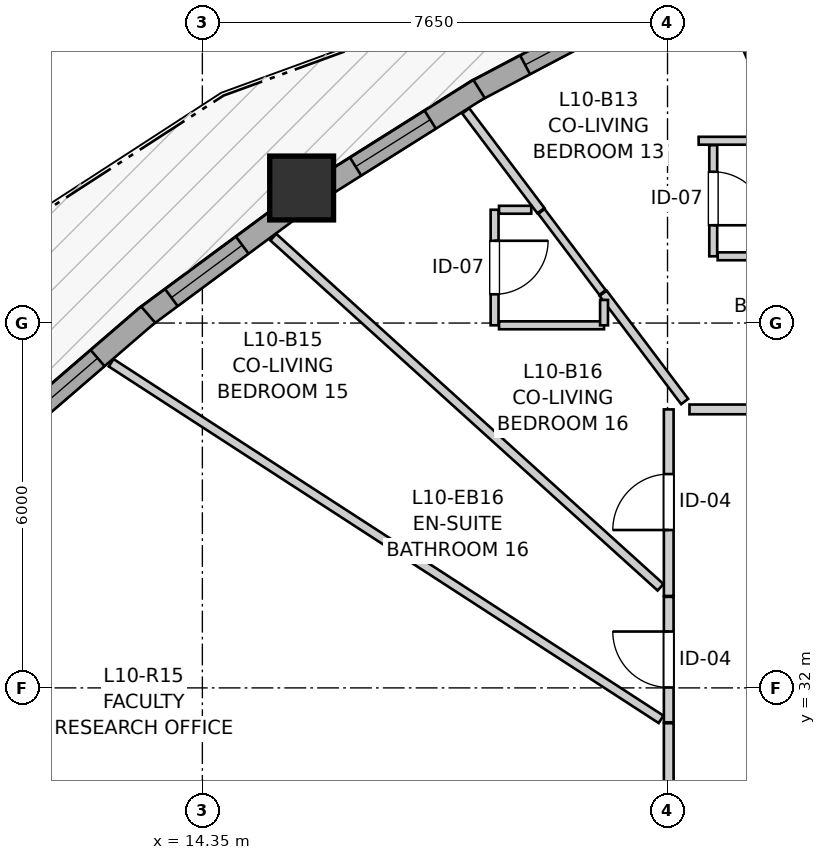
"""IFC4 building model, lengths in metres.
Left out: names, types, materials, properties, quantities, classifications, styles, units other than length and angle.
Written with IfcOpenShell. Run it as: python <this file> out.ifc"""

import sys

from ifc_helpers import new_model, si_unit, direction, frame, frame_2d, origin, origin_2d, place, context, subcontext, project, spatial, rectangle, extrude, source, transform, mapped, element, fill, save


model = new_model("IFC4")
c1 = context("Model", 3, precision=1e-05, world=origin(), true_north=direction((0.0, 1.0)))
c2 = subcontext(c1, "Body", "Model", "MODEL_VIEW")
j1 = project(units=[si_unit("LENGTHUNIT", "METRE"), si_unit("PLANEANGLEUNIT", "RADIAN")], contexts=[c1])
p1 = place(None, origin())
s1 = spatial("IfcSite", under=j1, at=p1, CompositionType="ELEMENT")
p2 = place(p1, origin())
s2 = spatial("IfcBuilding", under=s1, at=p2, CompositionType="ELEMENT")
p3 = place(p2, frame((0.0, 0.0, 36.6)))
s3 = spatial("IfcBuildingStorey", under=s2, at=p3, CompositionType="ELEMENT", Elevation=36.6)
m1 = source(origin(), c2, "Body", "SweptSolid", [
    extrude(rectangle(XDim=1.05, YDim=1.05, at=origin_2d()), origin(), (0.0, 0.0, 1.0), 2.94),
])
p4 = place(p3, frame((15.983, 40.221, 0.0), z_axis=(0.0, 0.0, 1.0), x_axis=(1.0, 0.0, 0.0)))
e1 = element("IfcColumn", 1, at=p4, inside=s3, PredefinedType="COLUMN", context=c2, shape_type="MappedRepresentation", body=[
    mapped(m1, transform((0.0, 0.0, 0.0), x_axis=(1.0, 0.0, 0.0), y_axis=(0.0, 1.0, 0.0), z_axis=(0.0, 0.0, 1.0), scale=1.0)),
])
p5 = place(p3, frame((21.757, 43.354, 0.0), z_axis=(0.0, 0.0, 1.0), x_axis=(-0.884394035355, -0.466741031224, 0.0)))
e2 = element("IfcWall", 2, at=p5, inside=s3, PredefinedType="SOLIDWALL", context=c2, shape_type="SweptSolid", body=[
    extrude(rectangle(XDim=3.317, YDim=0.35, at=frame_2d((1.659, 0.0))), origin(), (0.0, 0.0, 1.0), 2.42),
])
p6 = place(p5, frame((0.924, 0.0, 0.82)))
e3 = element("IfcOpeningElement", 3, at=p6, cuts=e2, PredefinedType="OPENING", context=c2, shape_type="SweptSolid", body=[
    extrude(rectangle(XDim=1.45, YDim=1.25, at=frame_2d((0.725, 0.625))), frame((0.0, 0.185, 0.0), z_axis=(0.0, -1.0, 0.0), x_axis=(1.0, 0.0, 0.0)), (0.0, 0.0, 1.0), 0.37),
])
p7 = place(p3, frame((18.901, 41.85, 0.0), z_axis=(0.0, 0.0, 1.0), x_axis=(-0.846436796602, -0.532489201167, 0.0)))
e4 = element("IfcWall", 4, at=p7, inside=s3, PredefinedType="SOLIDWALL", context=c2, shape_type="SweptSolid", body=[
    extrude(rectangle(XDim=3.038, YDim=0.35, at=frame_2d((1.519, 0.0))), origin(), (0.0, 0.0, 1.0), 2.42),
])
p8 = place(p7, frame((0.948, 0.0, 0.82)))
e5 = element("IfcOpeningElement", 5, at=p8, cuts=e4, PredefinedType="OPENING", context=c2, shape_type="SweptSolid", body=[
    extrude(rectangle(XDim=1.45, YDim=1.25, at=frame_2d((0.725, 0.625))), frame((0.0, 0.185, 0.0), z_axis=(0.0, -1.0, 0.0), x_axis=(1.0, 0.0, 0.0)), (0.0, 0.0, 1.0), 0.37),
])
p9 = place(p3, frame((15.846, 39.902, 0.0), z_axis=(0.0, 0.0, 1.0), x_axis=(-0.803789189233, -0.594914228501, 0.0)))
e6 = element("IfcWall", 6, at=p9, inside=s3, PredefinedType="SOLIDWALL", context=c2, shape_type="SweptSolid", body=[
    extrude(rectangle(XDim=3.056, YDim=0.35, at=frame_2d((1.528, 0.0))), origin(), (0.0, 0.0, 1.0), 2.42),
])
p10 = place(p9, frame((1.044, 0.0, 0.82)))
e7 = element("IfcOpeningElement", 7, at=p10, cuts=e6, PredefinedType="OPENING", context=c2, shape_type="SweptSolid", body=[
    extrude(rectangle(XDim=1.45, YDim=1.25, at=frame_2d((0.725, 0.625))), frame((0.0, 0.185, 0.0), z_axis=(0.0, -1.0, 0.0), x_axis=(1.0, 0.0, 0.0)), (0.0, 0.0, 1.0), 0.37),
])
p11 = place(p3, frame((13.458, 38.139, 0.0), z_axis=(0.0, 0.0, 1.0), x_axis=(-0.757450680395, -0.652892385289, 0.0)))
e8 = element("IfcWall", 8, at=p11, inside=s3, PredefinedType="SOLIDWALL", context=c2, shape_type="SweptSolid", body=[
    extrude(rectangle(XDim=3.374, YDim=0.35, at=frame_2d((1.687, 0.0))), origin(), (0.0, 0.0, 1.0), 2.42),
])
p12 = place(p11, frame((1.097, 0.0, 0.82)))
e9 = element("IfcOpeningElement", 9, at=p12, cuts=e8, PredefinedType="OPENING", context=c2, shape_type="SweptSolid", body=[
    extrude(rectangle(XDim=1.95, YDim=1.4, at=frame_2d((0.975, 0.7))), frame((0.0, 0.185, 0.0), z_axis=(0.0, -1.0, 0.0), x_axis=(1.0, 0.0, 0.0)), (0.0, 0.0, 1.0), 0.37),
])
p13 = place(p3, frame((22.02, 27.85, 0.0), z_axis=(0.0, 0.0, 1.0), x_axis=(0.0, 1.0, 0.0)))
e10 = element("IfcWall", 10, at=p13, inside=s3, PredefinedType="PARTITIONING", context=c2, shape_type="SweptSolid", body=[
    extrude(rectangle(XDim=3.569, YDim=0.16, at=frame_2d((1.784, 0.0))), origin(), (0.0, 0.0, 1.0), 2.94),
])
p14 = place(p13, frame((1.325, 0.0, 0.0)))
e11 = element("IfcOpeningElement", 11, at=p14, cuts=e10, PredefinedType="OPENING", context=c2, shape_type="SweptSolid", body=[
    extrude(rectangle(XDim=0.96, YDim=2.1, at=frame_2d((0.48, 1.05))), frame((0.0, 0.09, 0.0), z_axis=(0.0, -1.0, 0.0), x_axis=(1.0, 0.0, 0.0)), (0.0, 0.0, 1.0), 0.18),
])
p15 = place(p3, frame((22.361, 36.58, 0.0), z_axis=(0.0, 0.0, 1.0), x_axis=(1.0, 0.0, 0.0)))
e12 = element("IfcWall", 12, at=p15, inside=s3, PredefinedType="PARTITIONING", context=c2, shape_type="SweptSolid", body=[
    extrude(rectangle(XDim=3.498, YDim=0.16, at=frame_2d((1.749, 0.0))), origin(), (0.0, 0.0, 1.0), 2.548),
])
p16 = place(p15, frame((1.291, 0.0, 0.0)))
e13 = element("IfcOpeningElement", 13, at=p16, cuts=e12, PredefinedType="OPENING", context=c2, shape_type="SweptSolid", body=[
    extrude(rectangle(XDim=0.92, YDim=2.1, at=frame_2d((0.46, 1.05))), frame((0.0, 0.09, 0.0), z_axis=(0.0, -1.0, 0.0), x_axis=(1.0, 0.0, 0.0)), (0.0, 0.0, 1.0), 0.18),
])
p17 = place(p3, frame((22.02, 33.512, 0.0), z_axis=(0.0, 0.0, 1.0), x_axis=(0.0, 1.0, 0.0)))
e14 = element("IfcWall", 14, at=p17, inside=s3, PredefinedType="PARTITIONING", context=c2, shape_type="SweptSolid", body=[
    extrude(rectangle(XDim=3.068, YDim=0.16, at=frame_2d((1.534, 0.0))), origin(), (0.0, 0.0, 1.0), 2.94),
])
p18 = place(p17, frame((1.084, 0.0, 0.0)))
e15 = element("IfcOpeningElement", 15, at=p18, cuts=e14, PredefinedType="OPENING", context=c2, shape_type="SweptSolid", body=[
    extrude(rectangle(XDim=0.92, YDim=2.1, at=frame_2d((0.46, 1.05))), frame((0.0, 0.09, 0.0), z_axis=(0.0, -1.0, 0.0), x_axis=(1.0, 0.0, 0.0)), (0.0, 0.0, 1.0), 0.18),
])
p19 = place(p3, frame((22.02, 31.434, 0.0), z_axis=(0.0, 0.0, 1.0), x_axis=(0.0, 1.0, 0.0)))
e16 = element("IfcWall", 16, at=p19, inside=s3, PredefinedType="PARTITIONING", context=c2, shape_type="SweptSolid", body=[
    extrude(rectangle(XDim=2.063, YDim=0.16, at=frame_2d((1.031, 0.0))), origin(), (0.0, 0.0, 1.0), 2.94),
])
p20 = place(p19, frame((0.573, 0.0, 0.0)))
e17 = element("IfcOpeningElement", 17, at=p20, cuts=e16, PredefinedType="OPENING", context=c2, shape_type="SweptSolid", body=[
    extrude(rectangle(XDim=0.92, YDim=2.1, at=frame_2d((0.46, 1.05))), frame((0.0, 0.09, 0.0), z_axis=(0.0, -1.0, 0.0), x_axis=(1.0, 0.0, 0.0)), (0.0, 0.0, 1.0), 0.18),
])
p21 = place(p3, frame((22.752, 40.925, 0.0), z_axis=(0.0, 0.0, 1.0), x_axis=(0.0, -1.0, 0.0)))
e18 = element("IfcWall", 18, at=p21, inside=s3, PredefinedType="PARTITIONING", context=c2, shape_type="SweptSolid", body=[
    extrude(rectangle(XDim=1.827, YDim=0.13, at=frame_2d((0.914, 0.0))), origin(), (0.0, 0.0, 1.0), 2.94),
])
p22 = place(p21, frame((0.437, 0.0, 0.0)))
e19 = element("IfcOpeningElement", 19, at=p22, cuts=e18, PredefinedType="OPENING", context=c2, shape_type="SweptSolid", body=[
    extrude(rectangle(XDim=0.88, YDim=2.05, at=frame_2d((0.44, 1.025))), frame((0.0, 0.075, 0.0), z_axis=(0.0, -1.0, 0.0), x_axis=(1.0, 0.0, 0.0)), (0.0, 0.0, 1.0), 0.15),
])
p23 = place(p3, frame((19.156, 39.863, 0.0), z_axis=(0.0, 0.0, 1.0), x_axis=(0.0, -1.0, 0.0)))
e20 = element("IfcWall", 20, at=p23, inside=s3, PredefinedType="PARTITIONING", context=c2, shape_type="SweptSolid", body=[
    extrude(rectangle(XDim=1.9, YDim=0.13, at=frame_2d((0.95, 0.0))), origin(), (0.0, 0.0, 1.0), 2.94),
])
p24 = place(p23, frame((0.51, 0.0, 0.0)))
e21 = element("IfcOpeningElement", 21, at=p24, cuts=e20, PredefinedType="OPENING", context=c2, shape_type="SweptSolid", body=[
    extrude(rectangle(XDim=0.88, YDim=2.05, at=frame_2d((0.44, 1.025))), frame((0.0, 0.075, 0.0), z_axis=(0.0, -1.0, 0.0), x_axis=(1.0, 0.0, 0.0)), (0.0, 0.0, 1.0), 0.15),
])
p25 = place(p3, frame((12.85, 37.347, 0.0), z_axis=(0.0, 0.0, 1.0), x_axis=(0.839070272759, -0.544023048567, 0.0)))
e22 = element("IfcWall", 22, at=p25, inside=s3, PredefinedType="PARTITIONING", context=c2, shape_type="SweptSolid", body=[
    extrude(rectangle(XDim=10.779, YDim=0.145, at=frame_2d((5.389, 0.0))), origin(), (0.0, 0.0, 1.0), 2.94),
])
p26 = place(p3, frame((15.516, 39.413, 0.0), z_axis=(0.0, 0.0, 1.0), x_axis=(0.741796419009, -0.670625135784, 0.0)))
e23 = element("IfcWall", 23, at=p26, inside=s3, PredefinedType="PARTITIONING", context=c2, shape_type="SweptSolid", body=[
    extrude(rectangle(XDim=8.586, YDim=0.145, at=frame_2d((4.293, 0.0))), origin(), (0.0, 0.0, 1.0), 2.94),
])
p27 = place(p3, frame((22.841, 43.626, 0.0), z_axis=(0.0, 0.0, 1.0), x_axis=(0.392030625658, -0.919952166445, 0.0)))
e24 = element("IfcWall", 24, at=p27, inside=s3, PredefinedType="PARTITIONING", context=c2, shape_type="SweptSolid", body=[
    extrude(rectangle(XDim=2.747, YDim=0.145, at=frame_2d((1.374, 0.0))), origin(), (0.0, 0.0, 1.0), 2.94),
])
p28 = place(p3, frame((20.941, 38.49, 0.0), z_axis=(0.0, 0.0, 1.0), x_axis=(0.601733790382, -0.798696716853, 0.0)))
e25 = element("IfcWall", 25, at=p28, inside=s3, PredefinedType="PARTITIONING", context=c2, shape_type="SweptSolid", body=[
    extrude(rectangle(XDim=2.229, YDim=0.145, at=frame_2d((1.114, 0.0))), origin(), (0.0, 0.0, 1.0), 2.94),
])
p29 = place(p3, frame((18.681, 41.489, 0.0), z_axis=(0.0, 0.0, 1.0), x_axis=(0.601842551228, -0.79861476541, 0.0)))
e26 = element("IfcWall", 26, at=p29, inside=s3, PredefinedType="PARTITIONING", context=c2, shape_type="SweptSolid", body=[
    extrude(rectangle(XDim=2.055, YDim=0.145, at=frame_2d((1.027, 0.0))), origin(), (0.0, 0.0, 1.0), 2.94),
])
p30 = place(p3, frame((22.825, 39.098, 0.0), z_axis=(0.0, 0.0, 1.0), x_axis=(1.0, 0.0, 0.0)))
e27 = element("IfcWall", 27, at=p30, inside=s3, PredefinedType="PARTITIONING", context=c2, shape_type="SweptSolid", body=[
    extrude(rectangle(XDim=1.727, YDim=0.13, at=frame_2d((0.864, 0.0))), origin(), (0.0, 0.0, 1.0), 2.94),
])
p31 = place(p3, frame((19.229, 37.963, 0.0), z_axis=(0.0, 0.0, 1.0), x_axis=(1.0, 0.0, 0.0)))
e28 = element("IfcWall", 28, at=p31, inside=s3, PredefinedType="PARTITIONING", context=c2, shape_type="SweptSolid", body=[
    extrude(rectangle(XDim=1.727, YDim=0.13, at=frame_2d((0.864, 0.0))), origin(), (0.0, 0.0, 1.0), 2.508),
])
p32 = place(p3, frame((19.927, 39.836, 0.0), z_axis=(0.0, 0.0, 1.0), x_axis=(0.601846185739, -0.798612026401, 0.0)))
e29 = element("IfcWall", 29, at=p32, inside=s3, PredefinedType="PARTITIONING", context=c2, shape_type="SweptSolid", body=[
    extrude(rectangle(XDim=1.67, YDim=0.13, at=frame_2d((0.835, 0.0))), origin(), (0.0, 0.0, 1.0), 2.94),
])
p33 = place(p3, frame((22.512, 40.998, 0.0), z_axis=(0.0, 0.0, 1.0), x_axis=(1.0, 0.0, 0.0)))
e30 = element("IfcWall", 30, at=p33, inside=s3, PredefinedType="PARTITIONING", context=c2, shape_type="SweptSolid", body=[
    extrude(rectangle(XDim=1.689, YDim=0.13, at=frame_2d((0.844, 0.0))), origin(), (0.0, 0.0, 1.0), 2.94),
])
p34 = place(p3, frame((19.229, 39.863, 0.0), z_axis=(0.0, 0.0, 1.0), x_axis=(1.0, 0.0, 0.0)))
e31 = element("IfcWall", 31, at=p34, inside=s3, PredefinedType="PARTITIONING", context=c2, shape_type="SweptSolid", body=[
    extrude(rectangle(XDim=0.53, YDim=0.13, at=frame_2d((0.265, 0.0))), origin(), (0.0, 0.0, 1.0), 2.94),
])
p35 = place(p3, frame((20.956, 37.963, 0.0), z_axis=(0.0, 0.0, 1.0), x_axis=(0.0, 1.0, 0.0)))
e32 = element("IfcWall", 32, at=p35, inside=s3, PredefinedType="PARTITIONING", context=c2, shape_type="SweptSolid", body=[
    extrude(rectangle(XDim=0.417, YDim=0.13, at=frame_2d((0.208, 0.0))), origin(), (0.0, 0.0, 1.0), 2.94),
])
m2 = source(origin(), c2, "Body", "SweptSolid", [
    extrude(rectangle(XDim=1.45, YDim=1.25, at=frame_2d((0.725, 0.625))), frame((0.0, 0.03, 0.0), z_axis=(0.0, -1.0, 0.0), x_axis=(1.0, 0.0, 0.0)), (0.0, 0.0, 1.0), 0.06),
])
p36 = place(p6, origin())
e33 = element("IfcWindow", 33, at=p36, inside=s3, PartitioningType="SINGLE_PANEL", PredefinedType="WINDOW", context=c2, shape_type="MappedRepresentation", body=[
    mapped(m2, transform((0.0, 0.0, 0.0), x_axis=(1.0, 0.0, 0.0), y_axis=(0.0, 1.0, 0.0), z_axis=(0.0, 0.0, 1.0), scale=1.0)),
])
fill(e3, e33)
p37 = place(p8, origin())
e34 = element("IfcWindow", 34, at=p37, inside=s3, PartitioningType="SINGLE_PANEL", PredefinedType="WINDOW", context=c2, shape_type="MappedRepresentation", body=[
    mapped(m2, transform((0.0, 0.0, 0.0), x_axis=(1.0, 0.0, 0.0), y_axis=(0.0, 1.0, 0.0), z_axis=(0.0, 0.0, 1.0), scale=1.0)),
])
fill(e5, e34)
p38 = place(p10, origin())
e35 = element("IfcWindow", 35, at=p38, inside=s3, PartitioningType="SINGLE_PANEL", PredefinedType="WINDOW", context=c2, shape_type="MappedRepresentation", body=[
    mapped(m2, transform((0.0, 0.0, 0.0), x_axis=(1.0, 0.0, 0.0), y_axis=(0.0, 1.0, 0.0), z_axis=(0.0, 0.0, 1.0), scale=1.0)),
])
fill(e7, e35)
m3 = source(origin(), c2, "Body", "SweptSolid", [
    extrude(rectangle(XDim=1.95, YDim=1.4, at=frame_2d((0.975, 0.7))), frame((0.0, 0.03, 0.0), z_axis=(0.0, -1.0, 0.0), x_axis=(1.0, 0.0, 0.0)), (0.0, 0.0, 1.0), 0.06),
])
p39 = place(p12, origin())
e36 = element("IfcWindow", 36, at=p39, inside=s3, PartitioningType="SINGLE_PANEL", PredefinedType="WINDOW", context=c2, shape_type="MappedRepresentation", body=[
    mapped(m3, transform((0.0, 0.0, 0.0), x_axis=(1.0, 0.0, 0.0), y_axis=(0.0, 1.0, 0.0), z_axis=(0.0, 0.0, 1.0), scale=1.0)),
])
fill(e9, e36)
m4 = source(origin(), c2, "Body", "SweptSolid", [
    extrude(rectangle(XDim=0.92, YDim=2.1, at=frame_2d((0.46, 1.05))), frame((0.0, 0.025, 0.0), z_axis=(0.0, -1.0, 0.0), x_axis=(1.0, 0.0, 0.0)), (0.0, 0.0, 1.0), 0.05),
])
p40 = place(p18, origin())
e37 = element("IfcDoor", 37, at=p40, inside=s3, OperationType="SINGLE_SWING_LEFT", PredefinedType="DOOR", context=c2, shape_type="MappedRepresentation", body=[
    mapped(m4, transform((0.0, 0.0, 0.0), x_axis=(1.0, 0.0, 0.0), y_axis=(0.0, 1.0, 0.0), z_axis=(0.0, 0.0, 1.0), scale=1.0)),
])
fill(e15, e37)
p41 = place(p20, origin())
e38 = element("IfcDoor", 38, at=p41, inside=s3, OperationType="SINGLE_SWING_RIGHT", PredefinedType="DOOR", context=c2, shape_type="MappedRepresentation", body=[
    mapped(m4, transform((0.0, 0.0, 0.0), x_axis=(1.0, 0.0, 0.0), y_axis=(0.0, 1.0, 0.0), z_axis=(0.0, 0.0, 1.0), scale=1.0)),
])
fill(e17, e38)
m5 = source(origin(), c2, "Body", "SweptSolid", [
    extrude(rectangle(XDim=0.88, YDim=2.05, at=frame_2d((0.44, 1.025))), frame((0.0, 0.025, 0.0), z_axis=(0.0, -1.0, 0.0), x_axis=(1.0, 0.0, 0.0)), (0.0, 0.0, 1.0), 0.05),
])
p42 = place(p22, origin())
e39 = element("IfcDoor", 39, at=p42, inside=s3, OperationType="SINGLE_SWING_RIGHT", PredefinedType="DOOR", context=c2, shape_type="MappedRepresentation", body=[
    mapped(m5, transform((0.0, 0.0, 0.0), x_axis=(1.0, 0.0, 0.0), y_axis=(0.0, 1.0, 0.0), z_axis=(0.0, 0.0, 1.0), scale=1.0)),
])
fill(e19, e39)
p43 = place(p24, origin())
e40 = element("IfcDoor", 40, at=p43, inside=s3, OperationType="SINGLE_SWING_LEFT", PredefinedType="DOOR", context=c2, shape_type="MappedRepresentation", body=[
    mapped(m5, transform((0.0, 0.0, 0.0), x_axis=(1.0, 0.0, 0.0), y_axis=(0.0, 1.0, 0.0), z_axis=(0.0, 0.0, 1.0), scale=1.0)),
])
fill(e21, e40)
save(model, sys.argv[1])
